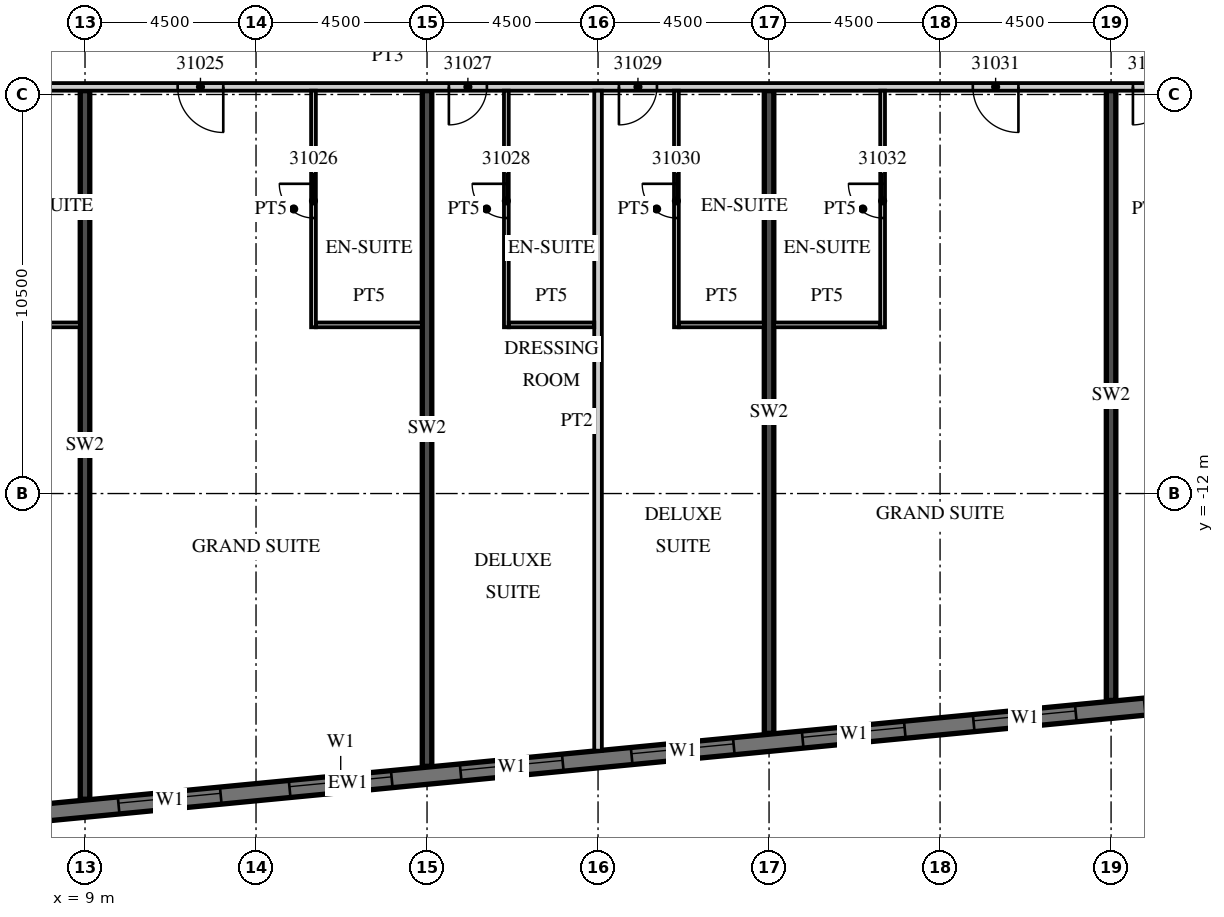
"""IFC4 building model, lengths in metres.
Left out: names, types, materials, properties, quantities, classifications, styles, units other than length and angle.
Written with IfcOpenShell. Run it as: python <this file> out.ifc"""

import sys

from ifc_helpers import new_model, si_unit, direction, frame, frame_2d, origin, place, context, subcontext, project, spatial, rectangle, extrude, element, fill, save


model = new_model("IFC4")
c1 = context("Model", 3, precision=1e-05, world=origin(), true_north=direction((0.0, 1.0)))
c2 = subcontext(c1, "Body", "Model", "MODEL_VIEW")
j1 = project(units=[si_unit("LENGTHUNIT", "METRE"), si_unit("PLANEANGLEUNIT", "RADIAN")], contexts=[c1])
p1 = place(None, origin())
s1 = spatial("IfcSite", under=j1, at=p1, CompositionType="ELEMENT")
p2 = place(p1, origin())
s2 = spatial("IfcBuilding", under=s1, at=p2, CompositionType="ELEMENT")
p3 = place(p2, frame((0.0, 0.0, 137.2)))
s3 = spatial("IfcBuildingStorey", under=s2, at=p3, CompositionType="ELEMENT", Elevation=137.2)
p4 = place(p3, frame((9.0, -20.044, 0.0), z_axis=(0.0, 0.0, 1.0), x_axis=(0.0, 1.0, 0.0)))
e1 = element("IfcWall", 1, at=p4, inside=s3, PredefinedType="SHEAR", context=c2, shape_type="SweptSolid", body=[
    extrude(rectangle(XDim=18.644, YDim=0.25, at=frame_2d((9.322, 0.0))), origin(), (0.0, 0.0, 1.0), 3.3),
])
p5 = place(p3, frame((18.0, -19.177, 0.0), z_axis=(0.0, 0.0, 1.0), x_axis=(0.0, 1.0, 0.0)))
e2 = element("IfcWall", 2, at=p5, inside=s3, PredefinedType="SHEAR", context=c2, shape_type="SweptSolid", body=[
    extrude(rectangle(XDim=17.777, YDim=0.25, at=frame_2d((8.889, 0.0))), origin(), (0.0, 0.0, 1.0), 3.3),
])
p6 = place(p3, frame((27.0, -18.311, 0.0), z_axis=(0.0, 0.0, 1.0), x_axis=(0.0, 1.0, 0.0)))
e3 = element("IfcWall", 3, at=p6, inside=s3, PredefinedType="SHEAR", context=c2, shape_type="SweptSolid", body=[
    extrude(rectangle(XDim=16.911, YDim=0.25, at=frame_2d((8.455, 0.0))), origin(), (0.0, 0.0, 1.0), 3.3),
])
p7 = place(p3, frame((36.0, -17.444, 0.0), z_axis=(0.0, 0.0, 1.0), x_axis=(0.0, 1.0, 0.0)))
e4 = element("IfcWall", 4, at=p7, inside=s3, PredefinedType="SHEAR", context=c2, shape_type="SweptSolid", body=[
    extrude(rectangle(XDim=16.044, YDim=0.25, at=frame_2d((8.022, 0.0))), origin(), (0.0, 0.0, 1.0), 3.3),
])
p8 = place(p3, frame((-13.521, -22.46, 0.0), z_axis=(0.0, 0.0, 1.0), x_axis=(0.995396096335, 0.095846812164, 0.0)))
e5 = element("IfcWall", 5, at=p8, inside=s3, PredefinedType="SOLIDWALL", context=c2, shape_type="SweptSolid", body=[
    extrude(rectangle(XDim=59.151, YDim=0.45, at=frame_2d((29.575, 0.0))), origin(), (0.0, 0.0, 1.0), 3.02),
])
p9 = place(p8, frame((0.91, 0.0, 0.45)))
e6 = element("IfcOpeningElement", 6, at=p9, cuts=e5, PredefinedType="OPENING", context=c2, shape_type="SweptSolid", body=[
    extrude(rectangle(XDim=2.7, YDim=2.25, at=frame_2d((1.35, 1.125))), frame((0.0, 0.235, 0.0), z_axis=(0.0, -1.0, 0.0), x_axis=(1.0, 0.0, 0.0)), (0.0, 0.0, 1.0), 0.47),
])
p10 = place(p8, frame((5.431, 0.0, 0.45)))
e7 = element("IfcOpeningElement", 7, at=p10, cuts=e5, PredefinedType="OPENING", context=c2, shape_type="SweptSolid", body=[
    extrude(rectangle(XDim=2.7, YDim=2.25, at=frame_2d((1.35, 1.125))), frame((0.0, 0.235, 0.0), z_axis=(0.0, -1.0, 0.0), x_axis=(1.0, 0.0, 0.0)), (0.0, 0.0, 1.0), 0.47),
])
p11 = place(p8, frame((9.952, 0.0, 0.45)))
e8 = element("IfcOpeningElement", 8, at=p11, cuts=e5, PredefinedType="OPENING", context=c2, shape_type="SweptSolid", body=[
    extrude(rectangle(XDim=2.7, YDim=2.25, at=frame_2d((1.35, 1.125))), frame((0.0, 0.235, 0.0), z_axis=(0.0, -1.0, 0.0), x_axis=(1.0, 0.0, 0.0)), (0.0, 0.0, 1.0), 0.47),
])
p12 = place(p8, frame((14.473, 0.0, 0.45)))
e9 = element("IfcOpeningElement", 9, at=p12, cuts=e5, PredefinedType="OPENING", context=c2, shape_type="SweptSolid", body=[
    extrude(rectangle(XDim=2.7, YDim=2.25, at=frame_2d((1.35, 1.125))), frame((0.0, 0.235, 0.0), z_axis=(0.0, -1.0, 0.0), x_axis=(1.0, 0.0, 0.0)), (0.0, 0.0, 1.0), 0.47),
])
p13 = place(p8, frame((18.994, 0.0, 0.45)))
e10 = element("IfcOpeningElement", 10, at=p13, cuts=e5, PredefinedType="OPENING", context=c2, shape_type="SweptSolid", body=[
    extrude(rectangle(XDim=2.7, YDim=2.25, at=frame_2d((1.35, 1.125))), frame((0.0, 0.235, 0.0), z_axis=(0.0, -1.0, 0.0), x_axis=(1.0, 0.0, 0.0)), (0.0, 0.0, 1.0), 0.47),
])
p14 = place(p8, frame((23.514, 0.0, 0.45)))
e11 = element("IfcOpeningElement", 11, at=p14, cuts=e5, PredefinedType="OPENING", context=c2, shape_type="SweptSolid", body=[
    extrude(rectangle(XDim=2.7, YDim=2.25, at=frame_2d((1.35, 1.125))), frame((0.0, 0.235, 0.0), z_axis=(0.0, -1.0, 0.0), x_axis=(1.0, 0.0, 0.0)), (0.0, 0.0, 1.0), 0.47),
])
p15 = place(p8, frame((28.035, 0.0, 0.45)))
e12 = element("IfcOpeningElement", 12, at=p15, cuts=e5, PredefinedType="OPENING", context=c2, shape_type="SweptSolid", body=[
    extrude(rectangle(XDim=2.7, YDim=2.25, at=frame_2d((1.35, 1.125))), frame((0.0, 0.235, 0.0), z_axis=(0.0, -1.0, 0.0), x_axis=(1.0, 0.0, 0.0)), (0.0, 0.0, 1.0), 0.47),
])
p16 = place(p8, frame((32.556, 0.0, 0.45)))
e13 = element("IfcOpeningElement", 13, at=p16, cuts=e5, PredefinedType="OPENING", context=c2, shape_type="SweptSolid", body=[
    extrude(rectangle(XDim=2.7, YDim=2.25, at=frame_2d((1.35, 1.125))), frame((0.0, 0.235, 0.0), z_axis=(0.0, -1.0, 0.0), x_axis=(1.0, 0.0, 0.0)), (0.0, 0.0, 1.0), 0.47),
])
p17 = place(p8, frame((37.077, 0.0, 0.45)))
e14 = element("IfcOpeningElement", 14, at=p17, cuts=e5, PredefinedType="OPENING", context=c2, shape_type="SweptSolid", body=[
    extrude(rectangle(XDim=2.7, YDim=2.25, at=frame_2d((1.35, 1.125))), frame((0.0, 0.235, 0.0), z_axis=(0.0, -1.0, 0.0), x_axis=(1.0, 0.0, 0.0)), (0.0, 0.0, 1.0), 0.47),
])
p18 = place(p8, frame((41.598, 0.0, 0.45)))
e15 = element("IfcOpeningElement", 15, at=p18, cuts=e5, PredefinedType="OPENING", context=c2, shape_type="SweptSolid", body=[
    extrude(rectangle(XDim=2.7, YDim=2.25, at=frame_2d((1.35, 1.125))), frame((0.0, 0.235, 0.0), z_axis=(0.0, -1.0, 0.0), x_axis=(1.0, 0.0, 0.0)), (0.0, 0.0, 1.0), 0.47),
])
p19 = place(p8, frame((46.118, 0.0, 0.45)))
e16 = element("IfcOpeningElement", 16, at=p19, cuts=e5, PredefinedType="OPENING", context=c2, shape_type="SweptSolid", body=[
    extrude(rectangle(XDim=2.7, YDim=2.25, at=frame_2d((1.35, 1.125))), frame((0.0, 0.235, 0.0), z_axis=(0.0, -1.0, 0.0), x_axis=(1.0, 0.0, 0.0)), (0.0, 0.0, 1.0), 0.47),
])
p20 = place(p8, frame((50.639, 0.0, 0.45)))
e17 = element("IfcOpeningElement", 17, at=p20, cuts=e5, PredefinedType="OPENING", context=c2, shape_type="SweptSolid", body=[
    extrude(rectangle(XDim=2.7, YDim=2.25, at=frame_2d((1.35, 1.125))), frame((0.0, 0.235, 0.0), z_axis=(0.0, -1.0, 0.0), x_axis=(1.0, 0.0, 0.0)), (0.0, 0.0, 1.0), 0.47),
])
p21 = place(p8, frame((55.15, 0.0, 0.45)))
e18 = element("IfcOpeningElement", 18, at=p21, cuts=e5, PredefinedType="OPENING", context=c2, shape_type="SweptSolid", body=[
    extrude(rectangle(XDim=2.7, YDim=2.25, at=frame_2d((1.35, 1.125))), frame((0.0, 0.235, 0.0), z_axis=(0.0, -1.0, 0.0), x_axis=(1.0, 0.0, 0.0)), (0.0, 0.0, 1.0), 0.47),
])
p22 = place(p3, frame((-13.5, -1.3, 0.0), z_axis=(0.0, 0.0, 1.0), x_axis=(1.0, 0.0, 0.0)))
e19 = element("IfcWall", 19, at=p22, inside=s3, PredefinedType="PARTITIONING", context=c2, shape_type="SweptSolid", body=[
    extrude(rectangle(XDim=60.932, YDim=0.2, at=frame_2d((30.466, 0.0))), origin(), (0.0, 0.0, 1.0), 3.02),
])
p23 = place(p22, frame((2.925, 0.0, 0.0)))
e20 = element("IfcOpeningElement", 20, at=p23, cuts=e19, PredefinedType="OPENING", context=c2, shape_type="SweptSolid", body=[
    extrude(rectangle(XDim=1.0, YDim=2.1, at=frame_2d((0.5, 1.05))), frame((0.0, 0.11, 0.0), z_axis=(0.0, -1.0, 0.0), x_axis=(1.0, 0.0, 0.0)), (0.0, 0.0, 1.0), 0.22),
])
p24 = place(p22, frame((7.45, 0.0, 0.0)))
e21 = element("IfcOpeningElement", 21, at=p24, cuts=e19, PredefinedType="OPENING", context=c2, shape_type="SweptSolid", body=[
    extrude(rectangle(XDim=1.0, YDim=2.1, at=frame_2d((0.5, 1.05))), frame((0.0, 0.11, 0.0), z_axis=(0.0, -1.0, 0.0), x_axis=(1.0, 0.0, 0.0)), (0.0, 0.0, 1.0), 0.22),
])
p25 = place(p22, frame((9.55, 0.0, 0.0)))
e22 = element("IfcOpeningElement", 22, at=p25, cuts=e19, PredefinedType="OPENING", context=c2, shape_type="SweptSolid", body=[
    extrude(rectangle(XDim=1.0, YDim=2.1, at=frame_2d((0.5, 1.05))), frame((0.0, 0.11, 0.0), z_axis=(0.0, -1.0, 0.0), x_axis=(1.0, 0.0, 0.0)), (0.0, 0.0, 1.0), 0.22),
])
p26 = place(p22, frame((15.938, 0.0, 0.0)))
e23 = element("IfcOpeningElement", 23, at=p26, cuts=e19, PredefinedType="OPENING", context=c2, shape_type="SweptSolid", body=[
    extrude(rectangle(XDim=1.2, YDim=2.1, at=frame_2d((0.6, 1.05))), frame((0.0, 0.11, 0.0), z_axis=(0.0, -1.0, 0.0), x_axis=(1.0, 0.0, 0.0)), (0.0, 0.0, 1.0), 0.22),
])
p27 = place(p22, frame((24.938, 0.0, 0.0)))
e24 = element("IfcOpeningElement", 24, at=p27, cuts=e19, PredefinedType="OPENING", context=c2, shape_type="SweptSolid", body=[
    extrude(rectangle(XDim=1.2, YDim=2.1, at=frame_2d((0.6, 1.05))), frame((0.0, 0.11, 0.0), z_axis=(0.0, -1.0, 0.0), x_axis=(1.0, 0.0, 0.0)), (0.0, 0.0, 1.0), 0.22),
])
p28 = place(p22, frame((32.075, 0.0, 0.0)))
e25 = element("IfcOpeningElement", 25, at=p28, cuts=e19, PredefinedType="OPENING", context=c2, shape_type="SweptSolid", body=[
    extrude(rectangle(XDim=1.0, YDim=2.1, at=frame_2d((0.5, 1.05))), frame((0.0, 0.11, 0.0), z_axis=(0.0, -1.0, 0.0), x_axis=(1.0, 0.0, 0.0)), (0.0, 0.0, 1.0), 0.22),
])
p29 = place(p22, frame((36.55, 0.0, 0.0)))
e26 = element("IfcOpeningElement", 26, at=p29, cuts=e19, PredefinedType="OPENING", context=c2, shape_type="SweptSolid", body=[
    extrude(rectangle(XDim=1.0, YDim=2.1, at=frame_2d((0.5, 1.05))), frame((0.0, 0.11, 0.0), z_axis=(0.0, -1.0, 0.0), x_axis=(1.0, 0.0, 0.0)), (0.0, 0.0, 1.0), 0.22),
])
p30 = place(p22, frame((45.862, 0.0, 0.0)))
e27 = element("IfcOpeningElement", 27, at=p30, cuts=e19, PredefinedType="OPENING", context=c2, shape_type="SweptSolid", body=[
    extrude(rectangle(XDim=1.2, YDim=2.1, at=frame_2d((0.6, 1.05))), frame((0.0, 0.11, 0.0), z_axis=(0.0, -1.0, 0.0), x_axis=(1.0, 0.0, 0.0)), (0.0, 0.0, 1.0), 0.22),
])
p31 = place(p22, frame((50.075, 0.0, 0.0)))
e28 = element("IfcOpeningElement", 28, at=p31, cuts=e19, PredefinedType="OPENING", context=c2, shape_type="SweptSolid", body=[
    extrude(rectangle(XDim=1.0, YDim=2.1, at=frame_2d((0.5, 1.05))), frame((0.0, 0.11, 0.0), z_axis=(0.0, -1.0, 0.0), x_axis=(1.0, 0.0, 0.0)), (0.0, 0.0, 1.0), 0.22),
])
p32 = place(p22, frame((56.95, 0.0, 0.0)))
e29 = element("IfcOpeningElement", 29, at=p32, cuts=e19, PredefinedType="OPENING", context=c2, shape_type="SweptSolid", body=[
    extrude(rectangle(XDim=1.0, YDim=2.1, at=frame_2d((0.5, 1.05))), frame((0.0, 0.11, 0.0), z_axis=(0.0, -1.0, 0.0), x_axis=(1.0, 0.0, 0.0)), (0.0, 0.0, 1.0), 0.22),
])
p33 = place(p22, frame((59.882, 0.0, 0.0)))
e30 = element("IfcOpeningElement", 30, at=p33, cuts=e19, PredefinedType="OPENING", context=c2, shape_type="SweptSolid", body=[
    extrude(rectangle(XDim=0.9, YDim=2.1, at=frame_2d((0.45, 1.05))), frame((0.0, 0.11, 0.0), z_axis=(0.0, -1.0, 0.0), x_axis=(1.0, 0.0, 0.0)), (0.0, 0.0, 1.0), 0.22),
])
p34 = place(p3, frame((6.075, -7.562, 0.0), z_axis=(0.0, 0.0, 1.0), x_axis=(1.0, 0.0, 0.0)))
e31 = element("IfcWall", 31, at=p34, inside=s3, PredefinedType="PARTITIONING", context=c2, shape_type="SweptSolid", body=[
    extrude(rectangle(XDim=2.8, YDim=0.125, at=frame_2d((1.4, 0.0))), origin(), (0.0, 0.0, 1.0), 3.02),
])
p35 = place(p3, frame((15.012, -7.625, 0.0), z_axis=(0.0, 0.0, 1.0), x_axis=(0.0, 1.0, 0.0)))
e32 = element("IfcWall", 32, at=p35, inside=s3, PredefinedType="PARTITIONING", context=c2, shape_type="SweptSolid", body=[
    extrude(rectangle(XDim=6.225, YDim=0.125, at=frame_2d((3.113, 0.0))), origin(), (0.0, 0.0, 1.0), 3.02),
])
p36 = place(p35, frame((2.875, 0.0, 0.0)))
e33 = element("IfcOpeningElement", 33, at=p36, cuts=e32, PredefinedType="OPENING", context=c2, shape_type="SweptSolid", body=[
    extrude(rectangle(XDim=0.9, YDim=2.1, at=frame_2d((0.45, 1.05))), frame((0.0, 0.073, 0.0), z_axis=(0.0, -1.0, 0.0), x_axis=(1.0, 0.0, 0.0)), (0.0, 0.0, 1.0), 0.145),
])
p37 = place(p3, frame((15.075, -7.562, 0.0), z_axis=(0.0, 0.0, 1.0), x_axis=(1.0, 0.0, 0.0)))
e34 = element("IfcWall", 34, at=p37, inside=s3, PredefinedType="PARTITIONING", context=c2, shape_type="SweptSolid", body=[
    extrude(rectangle(XDim=2.8, YDim=0.125, at=frame_2d((1.4, 0.0))), origin(), (0.0, 0.0, 1.0), 3.02),
])
p38 = place(p3, frame((22.5, -18.766, 0.0), z_axis=(0.0, 0.0, 1.0), x_axis=(0.0, 1.0, 0.0)))
e35 = element("IfcWall", 35, at=p38, inside=s3, PredefinedType="PARTITIONING", context=c2, shape_type="SweptSolid", body=[
    extrude(rectangle(XDim=17.366, YDim=0.2, at=frame_2d((8.683, 0.0))), origin(), (0.0, 0.0, 1.0), 3.02),
])
p39 = place(p3, frame((20.087, -7.625, 0.0), z_axis=(0.0, 0.0, 1.0), x_axis=(0.0, 1.0, 0.0)))
e36 = element("IfcWall", 36, at=p39, inside=s3, PredefinedType="PARTITIONING", context=c2, shape_type="SweptSolid", body=[
    extrude(rectangle(XDim=6.225, YDim=0.125, at=frame_2d((3.113, 0.0))), origin(), (0.0, 0.0, 1.0), 3.02),
])
p40 = place(p39, frame((2.875, 0.0, 0.0)))
e37 = element("IfcOpeningElement", 37, at=p40, cuts=e36, PredefinedType="OPENING", context=c2, shape_type="SweptSolid", body=[
    extrude(rectangle(XDim=0.9, YDim=2.1, at=frame_2d((0.45, 1.05))), frame((0.0, 0.073, 0.0), z_axis=(0.0, -1.0, 0.0), x_axis=(1.0, 0.0, 0.0)), (0.0, 0.0, 1.0), 0.145),
])
p41 = place(p3, frame((20.15, -7.562, 0.0), z_axis=(0.0, 0.0, 1.0), x_axis=(1.0, 0.0, 0.0)))
e38 = element("IfcWall", 38, at=p41, inside=s3, PredefinedType="PARTITIONING", context=c2, shape_type="SweptSolid", body=[
    extrude(rectangle(XDim=2.25, YDim=0.125, at=frame_2d((1.125, 0.0))), origin(), (0.0, 0.0, 1.0), 3.02),
])
p42 = place(p3, frame((24.562, -7.625, 0.0), z_axis=(0.0, 0.0, 1.0), x_axis=(0.0, 1.0, 0.0)))
e39 = element("IfcWall", 39, at=p42, inside=s3, PredefinedType="PARTITIONING", context=c2, shape_type="SweptSolid", body=[
    extrude(rectangle(XDim=6.225, YDim=0.125, at=frame_2d((3.113, 0.0))), origin(), (0.0, 0.0, 1.0), 3.02),
])
p43 = place(p42, frame((2.875, 0.0, 0.0)))
e40 = element("IfcOpeningElement", 40, at=p43, cuts=e39, PredefinedType="OPENING", context=c2, shape_type="SweptSolid", body=[
    extrude(rectangle(XDim=0.9, YDim=2.1, at=frame_2d((0.45, 1.05))), frame((0.0, 0.073, 0.0), z_axis=(0.0, -1.0, 0.0), x_axis=(1.0, 0.0, 0.0)), (0.0, 0.0, 1.0), 0.145),
])
p44 = place(p3, frame((24.625, -7.562, 0.0), z_axis=(0.0, 0.0, 1.0), x_axis=(1.0, 0.0, 0.0)))
e41 = element("IfcWall", 41, at=p44, inside=s3, PredefinedType="PARTITIONING", context=c2, shape_type="SweptSolid", body=[
    extrude(rectangle(XDim=2.25, YDim=0.125, at=frame_2d((1.125, 0.0))), origin(), (0.0, 0.0, 1.0), 3.02),
])
p45 = place(p3, frame((29.988, -7.625, 0.0), z_axis=(0.0, 0.0, 1.0), x_axis=(0.0, 1.0, 0.0)))
e42 = element("IfcWall", 42, at=p45, inside=s3, PredefinedType="PARTITIONING", context=c2, shape_type="SweptSolid", body=[
    extrude(rectangle(XDim=6.225, YDim=0.125, at=frame_2d((3.113, 0.0))), origin(), (0.0, 0.0, 1.0), 3.02),
])
p46 = place(p45, frame((2.875, 0.0, 0.0)))
e43 = element("IfcOpeningElement", 43, at=p46, cuts=e42, PredefinedType="OPENING", context=c2, shape_type="SweptSolid", body=[
    extrude(rectangle(XDim=0.9, YDim=2.1, at=frame_2d((0.45, 1.05))), frame((0.0, 0.073, 0.0), z_axis=(0.0, -1.0, 0.0), x_axis=(1.0, 0.0, 0.0)), (0.0, 0.0, 1.0), 0.145),
])
p47 = place(p3, frame((27.125, -7.562, 0.0), z_axis=(0.0, 0.0, 1.0), x_axis=(1.0, 0.0, 0.0)))
e44 = element("IfcWall", 44, at=p47, inside=s3, PredefinedType="PARTITIONING", context=c2, shape_type="SweptSolid", body=[
    extrude(rectangle(XDim=2.8, YDim=0.125, at=frame_2d((1.4, 0.0))), origin(), (0.0, 0.0, 1.0), 3.02),
])
p48 = place(p14, origin())
e45 = element("IfcWindow", 45, at=p48, inside=s3, PartitioningType="SINGLE_PANEL", PredefinedType="WINDOW", context=c2, shape_type="SweptSolid", body=[
    extrude(rectangle(XDim=2.7, YDim=2.25, at=frame_2d((1.35, 1.125))), frame((0.0, 0.09, 0.0), z_axis=(0.0, -1.0, 0.0), x_axis=(1.0, 0.0, 0.0)), (0.0, 0.0, 1.0), 0.06),
])
fill(e11, e45)
p49 = place(p15, origin())
e46 = element("IfcWindow", 46, at=p49, inside=s3, PartitioningType="SINGLE_PANEL", PredefinedType="WINDOW", context=c2, shape_type="SweptSolid", body=[
    extrude(rectangle(XDim=2.7, YDim=2.25, at=frame_2d((1.35, 1.125))), frame((0.0, 0.09, 0.0), z_axis=(0.0, -1.0, 0.0), x_axis=(1.0, 0.0, 0.0)), (0.0, 0.0, 1.0), 0.06),
])
fill(e12, e46)
p50 = place(p16, origin())
e47 = element("IfcWindow", 47, at=p50, inside=s3, PartitioningType="SINGLE_PANEL", PredefinedType="WINDOW", context=c2, shape_type="SweptSolid", body=[
    extrude(rectangle(XDim=2.7, YDim=2.25, at=frame_2d((1.35, 1.125))), frame((0.0, 0.09, 0.0), z_axis=(0.0, -1.0, 0.0), x_axis=(1.0, 0.0, 0.0)), (0.0, 0.0, 1.0), 0.06),
])
fill(e13, e47)
p51 = place(p17, origin())
e48 = element("IfcWindow", 48, at=p51, inside=s3, PartitioningType="SINGLE_PANEL", PredefinedType="WINDOW", context=c2, shape_type="SweptSolid", body=[
    extrude(rectangle(XDim=2.7, YDim=2.25, at=frame_2d((1.35, 1.125))), frame((0.0, 0.09, 0.0), z_axis=(0.0, -1.0, 0.0), x_axis=(1.0, 0.0, 0.0)), (0.0, 0.0, 1.0), 0.06),
])
fill(e14, e48)
p52 = place(p18, origin())
e49 = element("IfcWindow", 49, at=p52, inside=s3, PartitioningType="SINGLE_PANEL", PredefinedType="WINDOW", context=c2, shape_type="SweptSolid", body=[
    extrude(rectangle(XDim=2.7, YDim=2.25, at=frame_2d((1.35, 1.125))), frame((0.0, 0.09, 0.0), z_axis=(0.0, -1.0, 0.0), x_axis=(1.0, 0.0, 0.0)), (0.0, 0.0, 1.0), 0.06),
])
fill(e15, e49)
p53 = place(p19, origin())
e50 = element("IfcWindow", 50, at=p53, inside=s3, PartitioningType="SINGLE_PANEL", PredefinedType="WINDOW", context=c2, shape_type="SweptSolid", body=[
    extrude(rectangle(XDim=2.7, YDim=2.25, at=frame_2d((1.35, 1.125))), frame((0.0, 0.09, 0.0), z_axis=(0.0, -1.0, 0.0), x_axis=(1.0, 0.0, 0.0)), (0.0, 0.0, 1.0), 0.06),
])
fill(e16, e50)
p54 = place(p27, origin())
e51 = element("IfcDoor", 51, at=p54, inside=s3, OperationType="SINGLE_SWING_RIGHT", PredefinedType="DOOR", context=c2, shape_type="SweptSolid", body=[
    extrude(rectangle(XDim=1.2, YDim=2.1, at=frame_2d((0.6, 1.05))), frame((0.0, 0.025, 0.0), z_axis=(0.0, -1.0, 0.0), x_axis=(1.0, 0.0, 0.0)), (0.0, 0.0, 1.0), 0.05),
])
fill(e24, e51)
p55 = place(p36, origin())
e52 = element("IfcDoor", 52, at=p55, inside=s3, OperationType="SINGLE_SWING_RIGHT", PredefinedType="DOOR", context=c2, shape_type="SweptSolid", body=[
    extrude(rectangle(XDim=0.9, YDim=2.1, at=frame_2d((0.45, 1.05))), frame((0.0, 0.025, 0.0), z_axis=(0.0, -1.0, 0.0), x_axis=(1.0, 0.0, 0.0)), (0.0, 0.0, 1.0), 0.05),
])
fill(e33, e52)
p56 = place(p28, origin())
e53 = element("IfcDoor", 53, at=p56, inside=s3, OperationType="SINGLE_SWING_LEFT", PredefinedType="DOOR", context=c2, shape_type="SweptSolid", body=[
    extrude(rectangle(XDim=1.0, YDim=2.1, at=frame_2d((0.5, 1.05))), frame((0.0, 0.025, 0.0), z_axis=(0.0, -1.0, 0.0), x_axis=(1.0, 0.0, 0.0)), (0.0, 0.0, 1.0), 0.05),
])
fill(e25, e53)
p57 = place(p40, origin())
e54 = element("IfcDoor", 54, at=p57, inside=s3, OperationType="SINGLE_SWING_RIGHT", PredefinedType="DOOR", context=c2, shape_type="SweptSolid", body=[
    extrude(rectangle(XDim=0.9, YDim=2.1, at=frame_2d((0.45, 1.05))), frame((0.0, 0.025, 0.0), z_axis=(0.0, -1.0, 0.0), x_axis=(1.0, 0.0, 0.0)), (0.0, 0.0, 1.0), 0.05),
])
fill(e37, e54)
p58 = place(p29, origin())
e55 = element("IfcDoor", 55, at=p58, inside=s3, OperationType="SINGLE_SWING_LEFT", PredefinedType="DOOR", context=c2, shape_type="SweptSolid", body=[
    extrude(rectangle(XDim=1.0, YDim=2.1, at=frame_2d((0.5, 1.05))), frame((0.0, 0.025, 0.0), z_axis=(0.0, -1.0, 0.0), x_axis=(1.0, 0.0, 0.0)), (0.0, 0.0, 1.0), 0.05),
])
fill(e26, e55)
p59 = place(p43, origin())
e56 = element("IfcDoor", 56, at=p59, inside=s3, OperationType="SINGLE_SWING_RIGHT", PredefinedType="DOOR", context=c2, shape_type="SweptSolid", body=[
    extrude(rectangle(XDim=0.9, YDim=2.1, at=frame_2d((0.45, 1.05))), frame((0.0, 0.025, 0.0), z_axis=(0.0, -1.0, 0.0), x_axis=(1.0, 0.0, 0.0)), (0.0, 0.0, 1.0), 0.05),
])
fill(e40, e56)
p60 = place(p30, origin())
e57 = element("IfcDoor", 57, at=p60, inside=s3, OperationType="SINGLE_SWING_RIGHT", PredefinedType="DOOR", context=c2, shape_type="SweptSolid", body=[
    extrude(rectangle(XDim=1.2, YDim=2.1, at=frame_2d((0.6, 1.05))), frame((0.0, 0.025, 0.0), z_axis=(0.0, -1.0, 0.0), x_axis=(1.0, 0.0, 0.0)), (0.0, 0.0, 1.0), 0.05),
])
fill(e27, e57)
p61 = place(p46, origin())
e58 = element("IfcDoor", 58, at=p61, inside=s3, OperationType="SINGLE_SWING_RIGHT", PredefinedType="DOOR", context=c2, shape_type="SweptSolid", body=[
    extrude(rectangle(XDim=0.9, YDim=2.1, at=frame_2d((0.45, 1.05))), frame((0.0, 0.025, 0.0), z_axis=(0.0, -1.0, 0.0), x_axis=(1.0, 0.0, 0.0)), (0.0, 0.0, 1.0), 0.05),
])
fill(e43, e58)
p62 = place(p31, origin())
e59 = element("IfcDoor", 59, at=p62, inside=s3, OperationType="SINGLE_SWING_LEFT", PredefinedType="DOOR", context=c2, shape_type="SweptSolid", body=[
    extrude(rectangle(XDim=1.0, YDim=2.1, at=frame_2d((0.5, 1.05))), frame((0.0, 0.025, 0.0), z_axis=(0.0, -1.0, 0.0), x_axis=(1.0, 0.0, 0.0)), (0.0, 0.0, 1.0), 0.05),
])
fill(e28, e59)
save(model, sys.argv[1])
